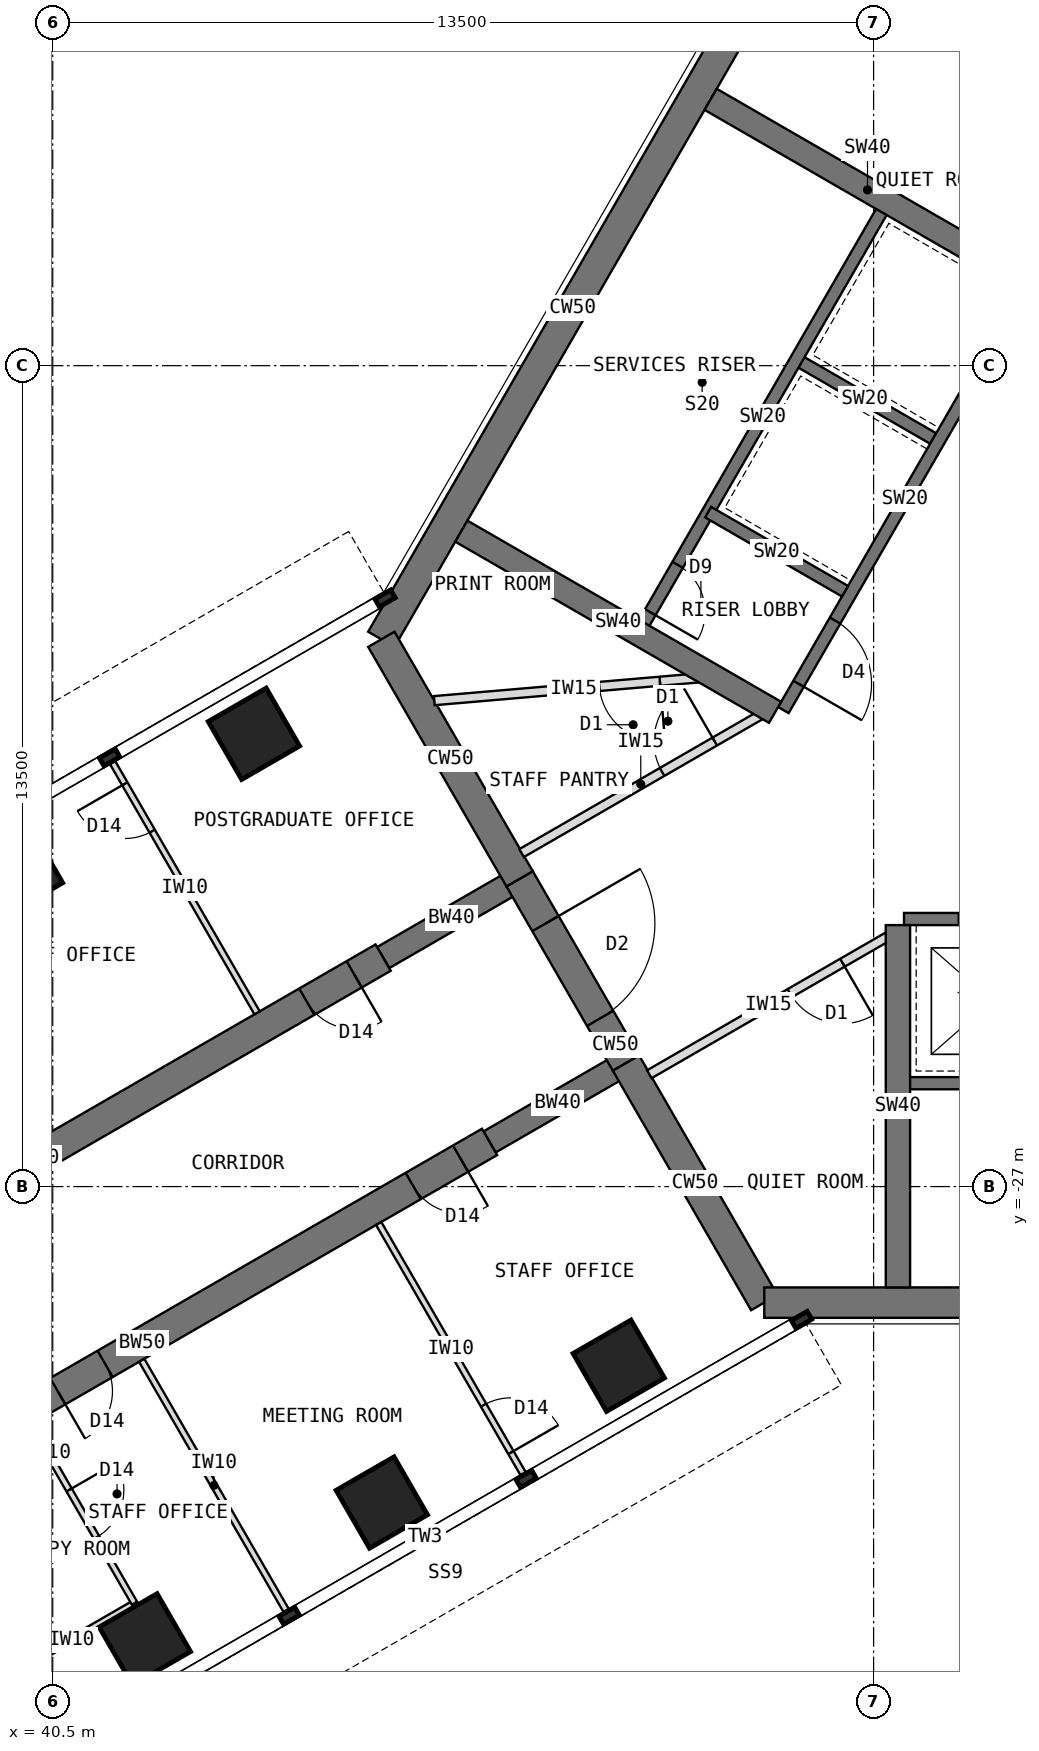
"""IFC4 building model, lengths in metres.
Left out: names, types, materials, properties, quantities, classifications, styles, units other than length and angle.
Written with IfcOpenShell. Run it as: python <this file> out.ifc"""

import sys

from ifc_helpers import new_model, si_unit, direction, frame, frame_2d, origin, origin_2d, place, context, subcontext, project, spatial, rectangle, extrude, element, fill, save


model = new_model("IFC4")
c1 = context("Model", 3, precision=1e-05, world=origin(), true_north=direction((0.0, 1.0)))
c2 = subcontext(c1, "Body", "Model", "MODEL_VIEW")
j1 = project(units=[si_unit("LENGTHUNIT", "METRE"), si_unit("PLANEANGLEUNIT", "RADIAN")], contexts=[c1])
p1 = place(None, origin())
s1 = spatial("IfcSite", under=j1, at=p1, CompositionType="ELEMENT")
p2 = place(p1, origin())
s2 = spatial("IfcBuilding", under=s1, at=p2, CompositionType="ELEMENT")
p3 = place(p2, frame((0.0, 0.0, 234.5)))
s3 = spatial("IfcBuildingStorey", under=s2, at=p3, CompositionType="ELEMENT", Elevation=234.5)
p4 = place(p3, frame((52.202, -7.092, 0.0), z_axis=(0.0, 0.0, 1.0), x_axis=(-0.500005998175, -0.866021940709, 0.0)))
e1 = element("IfcWall", 1, at=p4, inside=s3, PredefinedType="SHEAR", context=c2, shape_type="SweptSolid", body=[
    extrude(rectangle(XDim=12.596, YDim=0.5, at=frame_2d((6.298, 0.0))), origin(), (0.0, 0.0, 1.0), 4.0),
])
p5 = place(p3, frame((45.904, -18.0, 0.0), z_axis=(0.0, 0.0, 1.0), x_axis=(0.500024481964, -0.866011268655, 0.0)))
e2 = element("IfcWall", 2, at=p5, inside=s3, PredefinedType="SHEAR", context=c2, shape_type="SweptSolid", body=[
    extrude(rectangle(XDim=4.548, YDim=0.5, at=frame_2d((2.274, 0.0))), origin(), (0.0, 0.0, 1.0), 4.0),
])
p6 = place(p3, frame((48.178, -21.939, 0.0), z_axis=(0.0, 0.0, 1.0), x_axis=(0.500010275428, -0.866019471182, 0.0)))
e3 = element("IfcWall", 3, at=p6, inside=s3, PredefinedType="SHEAR", context=c2, shape_type="SweptSolid", body=[
    extrude(rectangle(XDim=3.5, YDim=0.5, at=frame_2d((1.75, 0.0))), origin(), (0.0, 0.0, 1.0), 4.0),
])
p7 = place(p6, frame((0.85, 0.0, 0.0)))
e4 = element("IfcOpeningElement", 4, at=p7, cuts=e3, PredefinedType="OPENING", context=c2, shape_type="SweptSolid", body=[
    extrude(rectangle(XDim=1.8, YDim=2.1, at=frame_2d((0.9, 1.05))), frame((0.0, 0.26, 0.0), z_axis=(0.0, -1.0, 0.0), x_axis=(1.0, 0.0, 0.0)), (0.0, 0.0, 1.0), 0.52),
])
p8 = place(p3, frame((49.928, -24.97, 0.0), z_axis=(0.0, 0.0, 1.0), x_axis=(0.499984222037, -0.866034513004, 0.0)))
e5 = element("IfcWall", 5, at=p8, inside=s3, PredefinedType="SHEAR", context=c2, shape_type="SweptSolid", body=[
    extrude(rectangle(XDim=4.548, YDim=0.5, at=frame_2d((2.274, 0.0))), origin(), (0.0, 0.0, 1.0), 4.0),
])
p9 = place(p3, frame((52.202, -28.908, 0.0), z_axis=(0.0, 0.0, 1.0), x_axis=(1.0, 0.0, 0.0)))
e6 = element("IfcWall", 6, at=p9, inside=s3, PredefinedType="SHEAR", context=c2, shape_type="SweptSolid", body=[
    extrude(rectangle(XDim=12.596, YDim=0.5, at=frame_2d((6.298, 0.0))), origin(), (0.0, 0.0, 1.0), 4.0),
])
p10 = place(p3, frame((49.928, -24.97, 0.0), z_axis=(0.0, 0.0, 1.0), x_axis=(-0.866031863473, -0.499988811324, 0.0)))
e7 = element("IfcWall", 7, at=p10, inside=s3, PredefinedType="SHEAR", context=c2, shape_type="SweptSolid", body=[
    extrude(rectangle(XDim=2.592, YDim=0.4, at=frame_2d((1.296, 0.0))), origin(), (0.0, 0.0, 1.0), 4.0),
])
p11 = place(p3, frame((47.684, -26.266, 0.0), z_axis=(0.0, 0.0, 1.0), x_axis=(-0.866027579429, -0.499996231654, 0.0)))
e8 = element("IfcWall", 8, at=p11, inside=s3, PredefinedType="SHEAR", context=c2, shape_type="SweptSolid", body=[
    extrude(rectangle(XDim=13.2, YDim=0.5, at=frame_2d((6.6, 0.0))), origin(), (0.0, 0.0, 1.0), 4.0),
])
p12 = place(p11, frame((0.55, 0.0, 0.0)))
e9 = element("IfcOpeningElement", 9, at=p12, cuts=e8, PredefinedType="OPENING", context=c2, shape_type="SweptSolid", body=[
    extrude(rectangle(XDim=0.9, YDim=2.1, at=frame_2d((0.45, 1.05))), frame((0.0, 0.26, 0.0), z_axis=(0.0, -1.0, 0.0), x_axis=(1.0, 0.0, 0.0)), (0.0, 0.0, 1.0), 0.52),
])
p13 = place(p11, frame((7.3, 0.0, 0.0)))
e10 = element("IfcOpeningElement", 10, at=p13, cuts=e8, PredefinedType="OPENING", context=c2, shape_type="SweptSolid", body=[
    extrude(rectangle(XDim=0.9, YDim=2.1, at=frame_2d((0.45, 1.05))), frame((0.0, 0.26, 0.0), z_axis=(0.0, -1.0, 0.0), x_axis=(1.0, 0.0, 0.0)), (0.0, 0.0, 1.0), 0.52),
])
p14 = place(p3, frame((48.178, -21.939, 0.0), z_axis=(0.0, 0.0, 1.0), x_axis=(-0.866072649678, -0.499918158782, 0.0)))
e11 = element("IfcWall", 11, at=p14, inside=s3, PredefinedType="SHEAR", context=c2, shape_type="SweptSolid", body=[
    extrude(rectangle(XDim=2.592, YDim=0.4, at=frame_2d((1.296, 0.0))), origin(), (0.0, 0.0, 1.0), 4.0),
])
p15 = place(p3, frame((45.934, -23.234, 0.0), z_axis=(0.0, 0.0, 1.0), x_axis=(-0.866019570528, -0.500010103361, 0.0)))
e12 = element("IfcWall", 12, at=p15, inside=s3, PredefinedType="SHEAR", context=c2, shape_type="SweptSolid", body=[
    extrude(rectangle(XDim=13.2, YDim=0.5, at=frame_2d((6.6, 0.0))), origin(), (0.0, 0.0, 1.0), 4.0),
])
p16 = place(p15, frame((0.55, 0.0, 0.0)))
e13 = element("IfcOpeningElement", 13, at=p16, cuts=e12, PredefinedType="OPENING", context=c2, shape_type="SweptSolid", body=[
    extrude(rectangle(XDim=0.9, YDim=2.1, at=frame_2d((0.45, 1.05))), frame((0.0, 0.26, 0.0), z_axis=(0.0, -1.0, 0.0), x_axis=(1.0, 0.0, 0.0)), (0.0, 0.0, 1.0), 0.52),
])
p17 = place(p15, frame((7.3, 0.0, 0.0)))
e14 = element("IfcOpeningElement", 14, at=p17, cuts=e12, PredefinedType="OPENING", context=c2, shape_type="SweptSolid", body=[
    extrude(rectangle(XDim=0.9, YDim=2.1, at=frame_2d((0.45, 1.05))), frame((0.0, 0.26, 0.0), z_axis=(0.0, -1.0, 0.0), x_axis=(1.0, 0.0, 0.0)), (0.0, 0.0, 1.0), 0.52),
])
for number, where, z_axis, x_axis in (
    (15, (49.809, -29.946, 0.0), (0.0, 0.0, 1.0), (0.866, 0.5, 0.0)),
    (16, (43.809, -19.554, 0.0), (0.0, 0.0, 1.0), (0.866, 0.5, 0.0)),
    (17, (45.912, -32.196, 0.0), (0.0, 0.0, 1.0), (0.866, 0.5, 0.0)),
    (18, (39.912, -21.804, 0.0), (0.0, 0.0, 1.0), (0.866, 0.5, 0.0)),
    (19, (42.014, -34.446, 0.0), (0.0, 0.0, 1.0), (0.866, 0.5, 0.0)),
):
    element("IfcColumn", number, at=place(p3, frame(where, z_axis=z_axis, x_axis=x_axis)), inside=s3, PredefinedType="COLUMN", context=c2, shape_type="SweptSolid", body=[
        extrude(rectangle(XDim=1.1, YDim=1.1, at=origin_2d()), origin(), (0.0, 0.0, 1.0), 4.0),
    ])
p18 = place(p3, frame((40.433, -36.456, 0.0), z_axis=(0.0, 0.0, 1.0), x_axis=(-0.500046648681, 0.865998469481, 0.0)))
e20 = element("IfcWall", 20, at=p18, inside=s3, PredefinedType="STANDARD", context=c2, shape_type="SweptSolid", body=[
    extrude(rectangle(XDim=2.325, YDim=0.25, at=frame_2d((1.163, 0.0))), origin(), (0.0, 0.0, 1.0), 3.7),
])
p19 = place(p3, frame((56.516, -12.236, 0.0), z_axis=(0.0, 0.0, 1.0), x_axis=(-0.49999894854, -0.866026010844, 0.0)))
e21 = element("IfcWall", 21, at=p19, inside=s3, PredefinedType="SHEAR", context=c2, shape_type="SweptSolid", body=[
    extrude(rectangle(XDim=8.0, YDim=0.2, at=frame_2d((4.0, 0.0))), origin(), (0.0, 0.0, 1.0), 4.0),
])
p20 = place(p19, frame((6.3, 0.0, 0.0)))
e22 = element("IfcOpeningElement", 22, at=p20, cuts=e21, PredefinedType="OPENING", context=c2, shape_type="SweptSolid", body=[
    extrude(rectangle(XDim=1.2, YDim=2.1, at=frame_2d((0.6, 1.05))), frame((0.0, 0.11, 0.0), z_axis=(0.0, -1.0, 0.0), x_axis=(1.0, 0.0, 0.0)), (0.0, 0.0, 1.0), 0.22),
])
for number, where, z_axis, x_axis in (
    (23, (54.98, -14.697, 0.0), (0.0, 0.0, 1.0), (-0.866, 0.5, 0.0)),
    (24, (53.53, -17.209, 0.0), (0.0, 0.0, 1.0), (-0.866, 0.5, 0.0)),
):
    element("IfcWall", number, at=place(p3, frame(where, z_axis=z_axis, x_axis=x_axis)), inside=s3, PredefinedType="SHEAR", context=c2, shape_type="SweptSolid", body=[
        extrude(rectangle(XDim=2.6, YDim=0.2, at=frame_2d((1.3, 0.0))), origin(), (0.0, 0.0, 1.0), 4.0),
    ])
p21 = place(p3, frame((54.178, -10.886, 0.0), z_axis=(0.0, 0.0, 1.0), x_axis=(-0.49999894854, -0.866026010844, 0.0)))
e25 = element("IfcWall", 25, at=p21, inside=s3, PredefinedType="SHEAR", context=c2, shape_type="SweptSolid", body=[
    extrude(rectangle(XDim=8.0, YDim=0.2, at=frame_2d((4.0, 0.0))), origin(), (0.0, 0.0, 1.0), 4.0),
])
p22 = place(p21, frame((6.8, 0.0, 0.0)))
e26 = element("IfcOpeningElement", 26, at=p22, cuts=e25, PredefinedType="OPENING", context=c2, shape_type="SweptSolid", body=[
    extrude(rectangle(XDim=0.9, YDim=2.1, at=frame_2d((0.45, 1.05))), frame((0.0, 0.11, 0.0), z_axis=(0.0, -1.0, 0.0), x_axis=(1.0, 0.0, 0.0)), (0.0, 0.0, 1.0), 0.22),
])
p23 = place(p3, frame((52.38, -19.201, 0.0), z_axis=(0.0, 0.0, 1.0), x_axis=(-0.866012946976, 0.500021575205, 0.0)))
e27 = element("IfcWall", 27, at=p23, inside=s3, PredefinedType="SHEAR", context=c2, shape_type="SweptSolid", body=[
    extrude(rectangle(XDim=5.958, YDim=0.4, at=frame_2d((2.979, 0.0))), origin(), (0.0, 0.0, 1.0), 4.0),
])
p24 = place(p3, frame((56.48, -12.099, 0.0), z_axis=(0.0, 0.0, 1.0), x_axis=(-0.86602319114, 0.500003832394, 0.0)))
e28 = element("IfcWall", 28, at=p24, inside=s3, PredefinedType="SHEAR", context=c2, shape_type="SweptSolid", body=[
    extrude(rectangle(XDim=5.958, YDim=0.4, at=frame_2d((2.979, 0.0))), origin(), (0.0, 0.0, 1.0), 4.0),
])
p25 = place(p3, frame((54.5, -22.6, 0.0), z_axis=(0.0, 0.0, 1.0), x_axis=(1.0, 0.0, 0.0)))
e29 = element("IfcWall", 29, at=p25, inside=s3, PredefinedType="SHEAR", context=c2, shape_type="SweptSolid", body=[
    extrude(rectangle(XDim=8.0, YDim=0.2, at=frame_2d((4.0, 0.0))), origin(), (0.0, 0.0, 1.0), 4.0),
])
p26 = place(p25, frame((6.3, 0.0, 0.0)))
e30 = element("IfcOpeningElement", 30, at=p26, cuts=e29, PredefinedType="OPENING", context=c2, shape_type="SweptSolid", body=[
    extrude(rectangle(XDim=1.2, YDim=2.1, at=frame_2d((0.6, 1.05))), frame((0.0, 0.11, 0.0), z_axis=(0.0, -1.0, 0.0), x_axis=(1.0, 0.0, 0.0)), (0.0, 0.0, 1.0), 0.22),
])
p27 = place(p25, frame((0.9, 0.0, 0.0)))
e31 = element("IfcOpeningElement", 31, at=p27, cuts=e29, PredefinedType="OPENING", context=c2, shape_type="SweptSolid", body=[
    extrude(rectangle(XDim=1.1, YDim=2.2, at=frame_2d((0.55, 1.1))), frame((0.0, 0.11, 0.0), z_axis=(0.0, -1.0, 0.0), x_axis=(1.0, 0.0, 0.0)), (0.0, 0.0, 1.0), 0.22),
])
p28 = place(p3, frame((54.5, -25.3, 0.0), z_axis=(0.0, 0.0, 1.0), x_axis=(1.0, 0.0, 0.0)))
e32 = element("IfcWall", 32, at=p28, inside=s3, PredefinedType="SHEAR", context=c2, shape_type="SweptSolid", body=[
    extrude(rectangle(XDim=8.0, YDim=0.2, at=frame_2d((4.0, 0.0))), origin(), (0.0, 0.0, 1.0), 4.0),
])
p29 = place(p28, frame((6.7, 0.0, 0.0)))
e33 = element("IfcOpeningElement", 33, at=p29, cuts=e32, PredefinedType="OPENING", context=c2, shape_type="SweptSolid", body=[
    extrude(rectangle(XDim=1.1, YDim=2.1, at=frame_2d((0.55, 1.05))), frame((0.0, 0.11, 0.0), z_axis=(0.0, -1.0, 0.0), x_axis=(1.0, 0.0, 0.0)), (0.0, 0.0, 1.0), 0.22),
])
p30 = place(p3, frame((54.4, -22.7, 0.0), z_axis=(0.0, 0.0, 1.0), x_axis=(0.0, -1.0, 0.0)))
e34 = element("IfcWall", 34, at=p30, inside=s3, PredefinedType="SHEAR", context=c2, shape_type="SweptSolid", body=[
    extrude(rectangle(XDim=5.958, YDim=0.4, at=frame_2d((2.979, 0.0))), origin(), (0.0, 0.0, 1.0), 4.0),
])
p31 = place(p3, frame((45.86, -27.607, 0.0), z_axis=(0.0, 0.0, 1.0), x_axis=(0.499986429846, -0.866033238375, 0.0)))
e35 = element("IfcWall", 35, at=p31, inside=s3, PredefinedType="PARTITIONING", context=c2, shape_type="SweptSolid", body=[
    extrude(rectangle(XDim=4.75, YDim=0.1, at=frame_2d((2.375, 0.0))), origin(), (0.0, 0.0, 1.0), 3.7),
])
p32 = place(p31, frame((3.45, 0.0, 0.0)))
e36 = element("IfcOpeningElement", 36, at=p32, cuts=e35, PredefinedType="OPENING", context=c2, shape_type="SweptSolid", body=[
    extrude(rectangle(XDim=0.9, YDim=2.1, at=frame_2d((0.45, 1.05))), frame((0.0, 0.06, 0.0), z_axis=(0.0, -1.0, 0.0), x_axis=(1.0, 0.0, 0.0)), (0.0, 0.0, 1.0), 0.12),
])
p33 = place(p3, frame((41.963, -29.857, 0.0), z_axis=(0.0, 0.0, 1.0), x_axis=(0.499986429846, -0.866033238375, 0.0)))
e37 = element("IfcWall", 37, at=p33, inside=s3, PredefinedType="PARTITIONING", context=c2, shape_type="SweptSolid", body=[
    extrude(rectangle(XDim=4.75, YDim=0.1, at=frame_2d((2.375, 0.0))), origin(), (0.0, 0.0, 1.0), 3.7),
])
p34 = place(p3, frame((41.844, -33.852, 0.0), z_axis=(0.0, 0.0, 1.0), x_axis=(-0.866024647952, -0.500001309137, 0.0)))
e38 = element("IfcWall", 38, at=p34, inside=s3, PredefinedType="PARTITIONING", context=c2, shape_type="SweptSolid", body=[
    extrude(rectangle(XDim=2.4, YDim=0.1, at=frame_2d((1.2, 0.0))), origin(), (0.0, 0.0, 1.0), 3.7),
])
p35 = place(p3, frame((40.144, -30.907, 0.0), z_axis=(0.0, 0.0, 1.0), x_axis=(0.499977295307, -0.866038511948, 0.0)))
e39 = element("IfcWall", 39, at=p35, inside=s3, PredefinedType="PARTITIONING", context=c2, shape_type="SweptSolid", body=[
    extrude(rectangle(XDim=3.4, YDim=0.1, at=frame_2d((1.7, 0.0))), origin(), (0.0, 0.0, 1.0), 3.7),
])
p36 = place(p35, frame((1.25, 0.0, 0.0)))
e40 = element("IfcOpeningElement", 40, at=p36, cuts=e39, PredefinedType="OPENING", context=c2, shape_type="SweptSolid", body=[
    extrude(rectangle(XDim=0.9, YDim=2.1, at=frame_2d((0.45, 1.05))), frame((0.0, 0.06, 0.0), z_axis=(0.0, -1.0, 0.0), x_axis=(1.0, 0.0, 0.0)), (0.0, 0.0, 1.0), 0.12),
])
p37 = place(p3, frame((43.86, -24.143, 0.0), z_axis=(0.0, 0.0, 1.0), x_axis=(-0.499986429846, 0.866033238375, 0.0)))
e41 = element("IfcWall", 41, at=p37, inside=s3, PredefinedType="PARTITIONING", context=c2, shape_type="SweptSolid", body=[
    extrude(rectangle(XDim=4.75, YDim=0.1, at=frame_2d((2.375, 0.0))), origin(), (0.0, 0.0, 1.0), 3.7),
])
p38 = place(p37, frame((3.45, 0.0, 0.0)))
e42 = element("IfcOpeningElement", 42, at=p38, cuts=e41, PredefinedType="OPENING", context=c2, shape_type="SweptSolid", body=[
    extrude(rectangle(XDim=0.9, YDim=2.1, at=frame_2d((0.45, 1.05))), frame((0.0, 0.06, 0.0), z_axis=(0.0, -1.0, 0.0), x_axis=(1.0, 0.0, 0.0)), (0.0, 0.0, 1.0), 0.12),
])
p39 = place(p3, frame((54.23, -22.89, 0.0), z_axis=(0.0, 0.0, 1.0), x_axis=(-0.866006805923, -0.500032211057, 0.0)))
e43 = element("IfcWall", 43, at=p39, inside=s3, PredefinedType="PARTITIONING", context=c2, shape_type="SweptSolid", body=[
    extrude(rectangle(XDim=4.526, YDim=0.15, at=frame_2d((2.263, 0.0))), origin(), (0.0, 0.0, 1.0), 3.7),
])
p40 = place(p39, frame((0.858, 0.0, 0.0)))
e44 = element("IfcOpeningElement", 44, at=p40, cuts=e43, PredefinedType="OPENING", context=c2, shape_type="SweptSolid", body=[
    extrude(rectangle(XDim=1.0, YDim=2.1, at=frame_2d((0.5, 1.05))), frame((0.0, 0.085, 0.0), z_axis=(0.0, -1.0, 0.0), x_axis=(1.0, 0.0, 0.0)), (0.0, 0.0, 1.0), 0.17),
])
p41 = place(p3, frame((48.211, -21.515, 0.0), z_axis=(0.0, 0.0, 1.0), x_axis=(0.866043651885, 0.499968392031, 0.0)))
e45 = element("IfcWall", 45, at=p41, inside=s3, PredefinedType="PARTITIONING", context=c2, shape_type="SweptSolid", body=[
    extrude(rectangle(XDim=4.526, YDim=0.15, at=frame_2d((2.263, 0.0))), origin(), (0.0, 0.0, 1.0), 3.7),
])
p42 = place(p41, frame((2.668, 0.0, 0.0)))
e46 = element("IfcOpeningElement", 46, at=p42, cuts=e45, PredefinedType="OPENING", context=c2, shape_type="SweptSolid", body=[
    extrude(rectangle(XDim=1.0, YDim=2.1, at=frame_2d((0.5, 1.05))), frame((0.0, 0.085, 0.0), z_axis=(0.0, -1.0, 0.0), x_axis=(1.0, 0.0, 0.0)), (0.0, 0.0, 1.0), 0.17),
])
p43 = place(p3, frame((51.364, -18.614, 0.0), z_axis=(0.0, 0.0, 1.0), x_axis=(-0.996314617181, -0.085774026317, 0.0)))
e47 = element("IfcWall", 47, at=p43, inside=s3, PredefinedType="PARTITIONING", context=c2, shape_type="SweptSolid", body=[
    extrude(rectangle(XDim=4.605, YDim=0.15, at=frame_2d((2.303, 0.0))), origin(), (0.0, 0.0, 1.0), 3.7),
])
p44 = place(p43, frame((0.882, 0.0, 0.0)))
e48 = element("IfcOpeningElement", 48, at=p44, cuts=e47, PredefinedType="OPENING", context=c2, shape_type="SweptSolid", body=[
    extrude(rectangle(XDim=1.0, YDim=2.1, at=frame_2d((0.5, 1.05))), frame((0.0, 0.085, 0.0), z_axis=(0.0, -1.0, 0.0), x_axis=(1.0, 0.0, 0.0)), (0.0, 0.0, 1.0), 0.17),
])
p45 = place(p20, origin())
e49 = element("IfcDoor", 49, at=p45, inside=s3, OperationType="SINGLE_SWING_RIGHT", PredefinedType="DOOR", context=c2, shape_type="SweptSolid", body=[
    extrude(rectangle(XDim=1.2, YDim=2.1, at=frame_2d((0.6, 1.05))), frame((0.0, 0.025, 0.0), z_axis=(0.0, -1.0, 0.0), x_axis=(1.0, 0.0, 0.0)), (0.0, 0.0, 1.0), 0.05),
])
fill(e22, e49)
p46 = place(p22, origin())
e50 = element("IfcDoor", 50, at=p46, inside=s3, OperationType="SINGLE_SWING_RIGHT", PredefinedType="DOOR", context=c2, shape_type="SweptSolid", body=[
    extrude(rectangle(XDim=0.9, YDim=2.1, at=frame_2d((0.45, 1.05))), frame((0.0, 0.025, 0.0), z_axis=(0.0, -1.0, 0.0), x_axis=(1.0, 0.0, 0.0)), (0.0, 0.0, 1.0), 0.05),
])
fill(e26, e50)
p47 = place(p7, origin())
e51 = element("IfcDoor", 51, at=p47, inside=s3, OperationType="DOUBLE_DOOR_DOUBLE_SWING", PredefinedType="DOOR", context=c2, shape_type="SweptSolid", body=[
    extrude(rectangle(XDim=1.8, YDim=2.1, at=frame_2d((0.9, 1.05))), frame((0.0, 0.025, 0.0), z_axis=(0.0, -1.0, 0.0), x_axis=(1.0, 0.0, 0.0)), (0.0, 0.0, 1.0), 0.05),
])
fill(e4, e51)
p48 = place(p32, origin())
e52 = element("IfcDoor", 52, at=p48, inside=s3, OperationType="SINGLE_SWING_RIGHT", PredefinedType="DOOR", context=c2, shape_type="SweptSolid", body=[
    extrude(rectangle(XDim=0.9, YDim=2.1, at=frame_2d((0.45, 1.05))), frame((0.0, 0.025, 0.0), z_axis=(0.0, -1.0, 0.0), x_axis=(1.0, 0.0, 0.0)), (0.0, 0.0, 1.0), 0.05),
])
fill(e36, e52)
p49 = place(p36, origin())
e53 = element("IfcDoor", 53, at=p49, inside=s3, OperationType="SINGLE_SWING_LEFT", PredefinedType="DOOR", context=c2, shape_type="SweptSolid", body=[
    extrude(rectangle(XDim=0.9, YDim=2.1, at=frame_2d((0.45, 1.05))), frame((0.0, 0.025, 0.0), z_axis=(0.0, -1.0, 0.0), x_axis=(1.0, 0.0, 0.0)), (0.0, 0.0, 1.0), 0.05),
])
fill(e40, e53)
p50 = place(p38, origin())
e54 = element("IfcDoor", 54, at=p50, inside=s3, OperationType="SINGLE_SWING_RIGHT", PredefinedType="DOOR", context=c2, shape_type="SweptSolid", body=[
    extrude(rectangle(XDim=0.9, YDim=2.1, at=frame_2d((0.45, 1.05))), frame((0.0, 0.025, 0.0), z_axis=(0.0, -1.0, 0.0), x_axis=(1.0, 0.0, 0.0)), (0.0, 0.0, 1.0), 0.05),
])
fill(e42, e54)
p51 = place(p44, origin())
e55 = element("IfcDoor", 55, at=p51, inside=s3, OperationType="SINGLE_SWING_LEFT", PredefinedType="DOOR", context=c2, shape_type="SweptSolid", body=[
    extrude(rectangle(XDim=1.0, YDim=2.1, at=frame_2d((0.5, 1.05))), frame((0.0, 0.025, 0.0), z_axis=(0.0, -1.0, 0.0), x_axis=(1.0, 0.0, 0.0)), (0.0, 0.0, 1.0), 0.05),
])
fill(e48, e55)
p52 = place(p42, origin())
e56 = element("IfcDoor", 56, at=p52, inside=s3, OperationType="SINGLE_SWING_RIGHT", PredefinedType="DOOR", context=c2, shape_type="SweptSolid", body=[
    extrude(rectangle(XDim=1.0, YDim=2.1, at=frame_2d((0.5, 1.05))), frame((0.0, 0.025, 0.0), z_axis=(0.0, -1.0, 0.0), x_axis=(1.0, 0.0, 0.0)), (0.0, 0.0, 1.0), 0.05),
])
fill(e46, e56)
p53 = place(p40, origin())
e57 = element("IfcDoor", 57, at=p53, inside=s3, OperationType="SINGLE_SWING_LEFT", PredefinedType="DOOR", context=c2, shape_type="SweptSolid", body=[
    extrude(rectangle(XDim=1.0, YDim=2.1, at=frame_2d((0.5, 1.05))), frame((0.0, 0.025, 0.0), z_axis=(0.0, -1.0, 0.0), x_axis=(1.0, 0.0, 0.0)), (0.0, 0.0, 1.0), 0.05),
])
fill(e44, e57)
p54 = place(p12, origin())
e58 = element("IfcDoor", 58, at=p54, inside=s3, OperationType="SINGLE_SWING_LEFT", PredefinedType="DOOR", context=c2, shape_type="SweptSolid", body=[
    extrude(rectangle(XDim=0.9, YDim=2.1, at=frame_2d((0.45, 1.05))), frame((0.0, 0.025, 0.0), z_axis=(0.0, -1.0, 0.0), x_axis=(1.0, 0.0, 0.0)), (0.0, 0.0, 1.0), 0.05),
])
fill(e9, e58)
p55 = place(p13, origin())
e59 = element("IfcDoor", 59, at=p55, inside=s3, OperationType="SINGLE_SWING_RIGHT", PredefinedType="DOOR", context=c2, shape_type="SweptSolid", body=[
    extrude(rectangle(XDim=0.9, YDim=2.1, at=frame_2d((0.45, 1.05))), frame((0.0, 0.025, 0.0), z_axis=(0.0, -1.0, 0.0), x_axis=(1.0, 0.0, 0.0)), (0.0, 0.0, 1.0), 0.05),
])
fill(e10, e59)
p56 = place(p16, origin())
e60 = element("IfcDoor", 60, at=p56, inside=s3, OperationType="SINGLE_SWING_LEFT", PredefinedType="DOOR", context=c2, shape_type="SweptSolid", body=[
    extrude(rectangle(XDim=0.9, YDim=2.1, at=frame_2d((0.45, 1.05))), frame((0.0, 0.025, 0.0), z_axis=(0.0, -1.0, 0.0), x_axis=(1.0, 0.0, 0.0)), (0.0, 0.0, 1.0), 0.05),
])
fill(e13, e60)
save(model, sys.argv[1])
